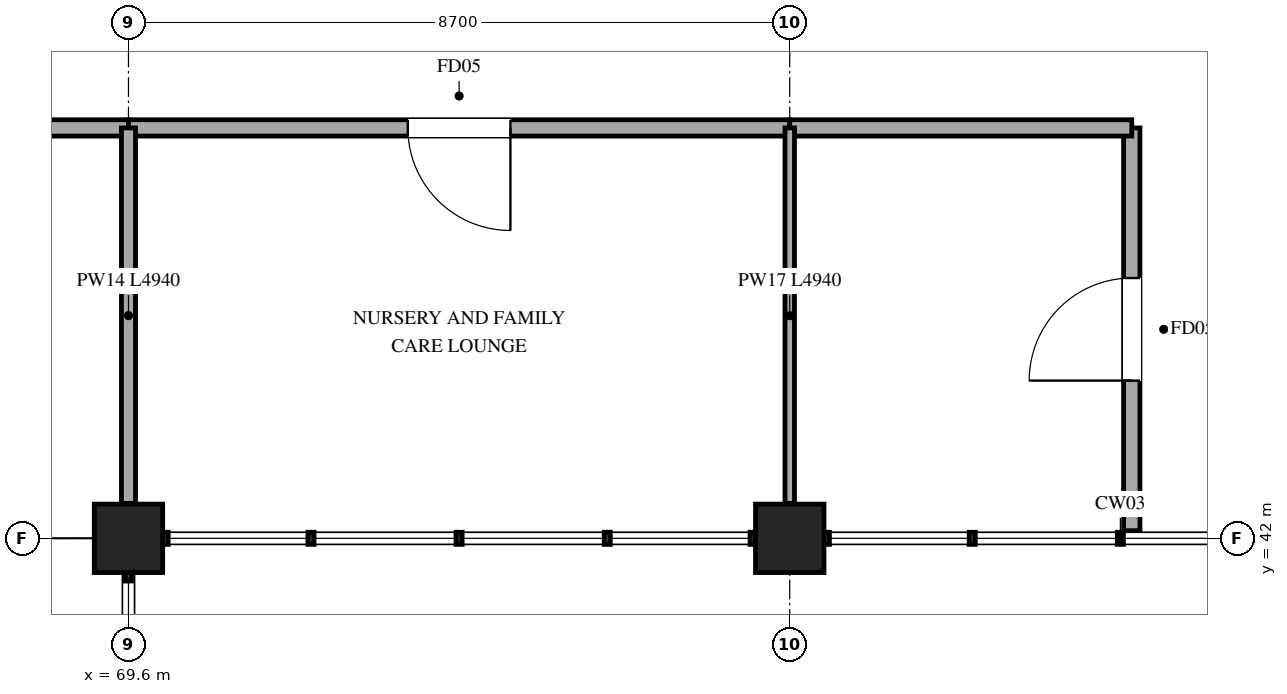
"""IFC4 building model, lengths in metres.
Left out: names, types, materials, properties, quantities, classifications, styles, units other than length and angle.
Written with IfcOpenShell. Run it as: python <this file> out.ifc"""

import sys

from ifc_helpers import new_model, si_unit, direction, frame, frame_2d, origin, origin_2d, place, context, subcontext, project, spatial, rectangle, extrude, element, fill, save


model = new_model("IFC4")
c1 = context("Model", 3, precision=1e-05, world=origin(), true_north=direction((0.0, 1.0)))
c2 = subcontext(c1, "Body", "Model", "MODEL_VIEW")
j1 = project(units=[si_unit("LENGTHUNIT", "METRE"), si_unit("PLANEANGLEUNIT", "RADIAN")], contexts=[c1])
p1 = place(None, origin())
s1 = spatial("IfcSite", under=j1, at=p1, CompositionType="ELEMENT")
p2 = place(p1, origin())
s2 = spatial("IfcBuilding", under=s1, at=p2, CompositionType="ELEMENT")
p3 = place(p2, frame((0.0, 0.0, 11.4)))
s3 = spatial("IfcBuildingStorey", under=s2, at=p3, CompositionType="ELEMENT", Elevation=11.4)
for number, where, z_axis, x_axis in (
    (1, (69.6, 42.0, 0.0), (0.0, 0.0, 1.0), (1.0, 0.0, 0.0)),
    (2, (78.3, 42.0, 0.0), (0.0, 0.0, 1.0), (1.0, 0.0, 0.0)),
):
    element("IfcColumn", number, at=place(p3, frame(where, z_axis=z_axis, x_axis=x_axis)), inside=s3, PredefinedType="COLUMN", context=c2, shape_type="SweptSolid", body=[
        extrude(rectangle(XDim=0.9, YDim=0.9, at=origin_2d()), origin(), (0.0, 0.0, 1.0), 5.1),
    ])
p4 = place(p3, frame((69.6, 47.4, 0.0), z_axis=(0.0, 0.0, 1.0), x_axis=(-1.0, 0.0, 0.0)))
e3 = element("IfcWall", 3, at=p4, inside=s3, PredefinedType="PARTITIONING", context=c2, shape_type="SweptSolid", body=[
    extrude(rectangle(XDim=7.05, YDim=0.215, at=frame_2d((3.525, 0.0))), origin(), (0.0, 0.0, 1.0), 4.06),
])
p5 = place(p3, frame((78.3, 47.4, 0.0), z_axis=(0.0, 0.0, 1.0), x_axis=(-1.0, 0.0, 0.0)))
e4 = element("IfcWall", 4, at=p5, inside=s3, PredefinedType="PARTITIONING", context=c2, shape_type="SweptSolid", body=[
    extrude(rectangle(XDim=8.7, YDim=0.215, at=frame_2d((4.35, 0.0))), origin(), (0.0, 0.0, 1.0), 4.06),
])
p6 = place(p5, frame((3.675, 0.0, 0.0)))
e5 = element("IfcOpeningElement", 5, at=p6, cuts=e4, PredefinedType="OPENING", context=c2, shape_type="SweptSolid", body=[
    extrude(rectangle(XDim=1.35, YDim=2.2, at=frame_2d((0.675, 1.1))), frame((0.0, 0.118, 0.0), z_axis=(0.0, -1.0, 0.0), x_axis=(1.0, 0.0, 0.0)), (0.0, 0.0, 1.0), 0.235),
])
p7 = place(p3, frame((82.8, 42.1, 0.0), z_axis=(0.0, 0.0, 1.0), x_axis=(0.0, 1.0, 0.0)))
e6 = element("IfcWall", 6, at=p7, inside=s3, PredefinedType="PARTITIONING", context=c2, shape_type="SweptSolid", body=[
    extrude(rectangle(XDim=5.3, YDim=0.215, at=frame_2d((2.65, 0.0))), origin(), (0.0, 0.0, 1.0), 4.16),
])
p8 = place(p7, frame((1.975, 0.0, 0.0)))
e7 = element("IfcOpeningElement", 7, at=p8, cuts=e6, PredefinedType="OPENING", context=c2, shape_type="SweptSolid", body=[
    extrude(rectangle(XDim=1.35, YDim=2.2, at=frame_2d((0.675, 1.1))), frame((0.0, 0.118, 0.0), z_axis=(0.0, -1.0, 0.0), x_axis=(1.0, 0.0, 0.0)), (0.0, 0.0, 1.0), 0.235),
])
p9 = place(p3, frame((82.8, 47.4, 0.0), z_axis=(0.0, 0.0, 1.0), x_axis=(-1.0, 0.0, 0.0)))
e8 = element("IfcWall", 8, at=p9, inside=s3, PredefinedType="PARTITIONING", context=c2, shape_type="SweptSolid", body=[
    extrude(rectangle(XDim=4.5, YDim=0.215, at=frame_2d((2.25, 0.0))), origin(), (0.0, 0.0, 1.0), 4.06),
])
p10 = place(p3, frame((69.6, 47.4, 0.0), z_axis=(0.0, 0.0, 1.0), x_axis=(0.0, -1.0, 0.0)))
e9 = element("IfcWall", 9, at=p10, inside=s3, PredefinedType="PARTITIONING", context=c2, shape_type="SweptSolid", body=[
    extrude(rectangle(XDim=4.94, YDim=0.185, at=frame_2d((2.47, 0.0))), origin(), (0.0, 0.0, 1.0), 4.06),
])
p11 = place(p3, frame((78.3, 47.4, 0.0), z_axis=(0.0, 0.0, 1.0), x_axis=(0.0, -1.0, 0.0)))
e10 = element("IfcWall", 10, at=p11, inside=s3, PredefinedType="PARTITIONING", context=c2, shape_type="SweptSolid", body=[
    extrude(rectangle(XDim=4.94, YDim=0.125, at=frame_2d((2.47, 0.0))), origin(), (0.0, 0.0, 1.0), 4.06),
])
p12 = place(p6, origin())
e11 = element("IfcDoor", 11, at=p12, inside=s3, OperationType="SINGLE_SWING_LEFT", PredefinedType="DOOR", context=c2, shape_type="SweptSolid", body=[
    extrude(rectangle(XDim=1.35, YDim=2.2, at=frame_2d((0.675, 1.1))), frame((0.0, 0.025, 0.0), z_axis=(0.0, -1.0, 0.0), x_axis=(1.0, 0.0, 0.0)), (0.0, 0.0, 1.0), 0.05),
])
fill(e5, e11)
p13 = place(p8, origin())
e12 = element("IfcDoor", 12, at=p13, inside=s3, OperationType="SINGLE_SWING_LEFT", PredefinedType="DOOR", context=c2, shape_type="SweptSolid", body=[
    extrude(rectangle(XDim=1.35, YDim=2.2, at=frame_2d((0.675, 1.1))), frame((0.0, 0.025, 0.0), z_axis=(0.0, -1.0, 0.0), x_axis=(1.0, 0.0, 0.0)), (0.0, 0.0, 1.0), 0.05),
])
fill(e7, e12)
save(model, sys.argv[1])
